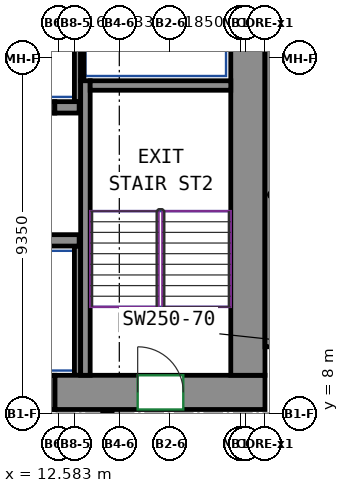
"""IFC4 building model, lengths in metres.
Left out: names, types, materials, properties, quantities, classifications, styles, units other than length and angle.
Written with IfcOpenShell. Run it as: python <this file> out.ifc"""

import sys

from ifc_helpers import new_model, si_unit, direction, frame, frame_2d, origin, place, context, subcontext, project, spatial, rectangle, extrude, source, transform, mapped, element, fill, save


model = new_model("IFC4")
c1 = context("Model", 3, precision=1e-05, world=origin(), true_north=direction((0.0, 1.0)))
c2 = subcontext(c1, "Body", "Model", "MODEL_VIEW")
j1 = project(units=[si_unit("LENGTHUNIT", "METRE"), si_unit("PLANEANGLEUNIT", "RADIAN")], contexts=[c1])
p1 = place(None, origin())
s1 = spatial("IfcSite", under=j1, at=p1, CompositionType="ELEMENT")
p2 = place(p1, origin())
s2 = spatial("IfcBuilding", under=s1, at=p2, CompositionType="ELEMENT")
p3 = place(p2, frame((0.0, 0.0, 154.1)))
s3 = spatial("IfcBuildingStorey", under=s2, at=p3, CompositionType="ELEMENT", Elevation=154.1)
m1 = source(origin(), c2, "Body", "SweptSolid", [
    extrude(rectangle(XDim=5.53, YDim=0.9, at=frame_2d((2.765, 0.0))), origin(), (0.0, 0.0, 1.0), 3.12),
])
p4 = place(p3, frame((12.47, 8.55, 0.0), z_axis=(0.0, 0.0, 1.0), x_axis=(1.0, 0.0, 0.0)))
e1 = element("IfcWall", 1, at=p4, inside=s3, PredefinedType="SHEAR", context=c2, shape_type="MappedRepresentation", body=[
    mapped(m1, transform((0.0, 0.0, 0.0))),
])
p5 = place(p4, frame((2.18, 0.0, 0.0)))
e2 = element("IfcOpeningElement", 2, at=p5, cuts=e1, PredefinedType="OPENING", context=c2, shape_type="SweptSolid", body=[
    extrude(rectangle(XDim=1.2, YDim=2.1, at=frame_2d((0.6, 1.05))), frame((0.0, 0.46, 0.0), z_axis=(0.0, -1.0, 0.0), x_axis=(1.0, 0.0, 0.0)), (0.0, 0.0, 1.0), 0.92),
])
m2 = source(origin(), c2, "Body", "SweptSolid", [
    extrude(rectangle(XDim=12.0, YDim=0.9, at=frame_2d((6.0, 0.0))), origin(), (0.0, 0.0, 1.0), 3.12),
])
p6 = place(p3, frame((17.55, 9.0, 0.0), z_axis=(0.0, 0.0, 1.0), x_axis=(0.0, 1.0, 0.0)))
e3 = element("IfcWall", 3, at=p6, inside=s3, PredefinedType="SHEAR", context=c2, shape_type="MappedRepresentation", body=[
    mapped(m2, transform((0.0, 0.0, 0.0))),
])
m3 = source(origin(), c2, "Body", "SweptSolid", [
    extrude(rectangle(XDim=7.75, YDim=0.25, at=frame_2d((3.875, 0.0))), origin(), (0.0, 0.0, 1.0), 3.12),
])
p7 = place(p3, frame((13.275, 9.0, 0.0), z_axis=(0.0, 0.0, 1.0), x_axis=(0.0, 1.0, 0.0)))
e4 = element("IfcWall", 4, at=p7, inside=s3, PredefinedType="SHEAR", context=c2, shape_type="MappedRepresentation", body=[
    mapped(m3, transform((0.0, 0.0, 0.0))),
])
m4 = source(origin(), c2, "Body", "SweptSolid", [
    extrude(rectangle(XDim=3.7, YDim=0.25, at=frame_2d((1.85, 0.0))), origin(), (0.0, 0.0, 1.0), 3.12),
])
p8 = place(p3, frame((13.4, 16.625, 0.0), z_axis=(0.0, 0.0, 1.0), x_axis=(1.0, 0.0, 0.0)))
e5 = element("IfcWall", 5, at=p8, inside=s3, PredefinedType="SHEAR", context=c2, shape_type="MappedRepresentation", body=[
    mapped(m4, transform((0.0, 0.0, 0.0))),
])
m5 = source(origin(), c2, "Body", "SweptSolid", [
    extrude(rectangle(XDim=8.0, YDim=0.35, at=frame_2d((4.0, 0.0))), origin(), (0.0, 0.0, 1.0), 3.12),
])
p9 = place(p3, frame((18.175, 9.75, 0.0), z_axis=(0.0, 0.0, 1.0), x_axis=(0.0, 1.0, 0.0)))
e6 = element("IfcWall", 6, at=p9, inside=s3, PredefinedType="SHEAR", context=c2, shape_type="MappedRepresentation", body=[
    mapped(m5, transform((0.0, 0.0, 0.0))),
])
m6 = source(origin(), c2, "Body", "SweptSolid", [
    extrude(rectangle(XDim=2.82, YDim=0.3, at=frame_2d((1.41, 0.0))), origin(), (0.0, 0.0, 1.0), 3.12),
])
p10 = place(p3, frame((10.29, 12.55, 0.0), z_axis=(0.0, 0.0, 1.0), x_axis=(1.0, 0.0, 0.0)))
e7 = element("IfcWall", 7, at=p10, inside=s3, PredefinedType="SHEAR", context=c2, shape_type="MappedRepresentation", body=[
    mapped(m6, transform((0.0, 0.0, 0.0))),
])
m7 = source(origin(), c2, "Body", "SweptSolid", [
    extrude(rectangle(XDim=0.64, YDim=0.3, at=frame_2d((0.32, 0.0))), origin(), (0.0, 0.0, 1.0), 3.12),
])
p11 = place(p3, frame((12.47, 16.05, 0.0), z_axis=(0.0, 0.0, 1.0), x_axis=(1.0, 0.0, 0.0)))
e8 = element("IfcWall", 8, at=p11, inside=s3, PredefinedType="SHEAR", context=c2, shape_type="MappedRepresentation", body=[
    mapped(m7, transform((0.0, 0.0, 0.0))),
])
m8 = source(origin(), c2, "Body", "SweptSolid", [
    extrude(rectangle(XDim=1.4, YDim=0.3, at=frame_2d((0.7, 0.0))), origin(), (0.0, 0.0, 1.0), 3.12),
])
p12 = place(p3, frame((11.07, 16.05, 0.0), z_axis=(0.0, 0.0, 1.0), x_axis=(1.0, 0.0, 0.0)))
e9 = element("IfcWall", 9, at=p12, inside=s3, PredefinedType="PARTITIONING", context=c2, shape_type="MappedRepresentation", body=[
    mapped(m8, transform((0.0, 0.0, 0.0))),
])
p13 = place(p12, frame((0.15, 0.0, 0.0)))
e10 = element("IfcOpeningElement", 10, at=p13, cuts=e9, PredefinedType="OPENING", context=c2, shape_type="SweptSolid", body=[
    extrude(rectangle(XDim=1.1, YDim=2.1, at=frame_2d((0.55, 1.05))), frame((0.0, 0.16, 0.0), z_axis=(0.0, -1.0, 0.0), x_axis=(1.0, 0.0, 0.0)), (0.0, 0.0, 1.0), 0.32),
])
m9 = source(origin(), c2, "Body", "SweptSolid", [
    extrude(rectangle(XDim=3.275, YDim=0.165, at=frame_2d((1.638, 0.0))), origin(), (0.0, 0.0, 1.0), 3.12),
])
p14 = place(p3, frame((13.067, 16.2, 0.0), z_axis=(0.0, 0.0, 1.0), x_axis=(0.0, 1.0, 0.0)))
e11 = element("IfcWall", 11, at=p14, inside=s3, PredefinedType="PARTITIONING", context=c2, shape_type="MappedRepresentation", body=[
    mapped(m9, transform((0.0, 0.0, 0.0))),
])
m10 = source(origin(), c2, "Body", "SweptSolid", [
    extrude(rectangle(XDim=2.725, YDim=0.085, at=frame_2d((1.363, 0.0))), origin(), (0.0, 0.0, 1.0), 3.12),
])
p15 = place(p3, frame((13.192, 16.75, 0.0), z_axis=(0.0, 0.0, 1.0), x_axis=(0.0, 1.0, 0.0)))
e12 = element("IfcWall", 12, at=p15, inside=s3, PredefinedType="PARTITIONING", context=c2, shape_type="MappedRepresentation", body=[
    mapped(m10, transform((0.0, 0.0, 0.0))),
])
m11 = source(origin(), c2, "Body", "SweptSolid", [
    extrude(rectangle(XDim=3.4, YDim=0.165, at=frame_2d((1.7, 0.0))), origin(), (0.0, 0.0, 1.0), 3.12),
])
p16 = place(p3, frame((13.067, 9.0, 0.0), z_axis=(0.0, 0.0, 1.0), x_axis=(0.0, 1.0, 0.0)))
e13 = element("IfcWall", 13, at=p16, inside=s3, PredefinedType="PARTITIONING", context=c2, shape_type="MappedRepresentation", body=[
    mapped(m11, transform((0.0, 0.0, 0.0))),
])
m12 = source(origin(), c2, "Body", "SweptSolid", [
    extrude(rectangle(XDim=1.4, YDim=0.9, at=frame_2d((0.7, 0.0))), origin(), (0.0, 0.0, 1.0), 2.7),
])
p17 = place(p3, frame((11.07, 8.55, 0.0), z_axis=(0.0, 0.0, 1.0), x_axis=(1.0, 0.0, 0.0)))
e14 = element("IfcWall", 14, at=p17, inside=s3, PredefinedType="PARTITIONING", context=c2, shape_type="MappedRepresentation", body=[
    mapped(m12, transform((0.0, 0.0, 0.0))),
])
p18 = place(p17, frame((0.25, 0.0, 0.0)))
e15 = element("IfcOpeningElement", 15, at=p18, cuts=e14, PredefinedType="OPENING", context=c2, shape_type="SweptSolid", body=[
    extrude(rectangle(XDim=0.9, YDim=2.1, at=frame_2d((0.45, 1.05))), frame((0.0, 0.46, 0.0), z_axis=(0.0, -1.0, 0.0), x_axis=(1.0, 0.0, 0.0)), (0.0, 0.0, 1.0), 0.92),
])
p19 = place(p5, origin())
e16 = element("IfcDoor", 16, at=p19, inside=s3, OperationType="DOUBLE_DOOR_SINGLE_SWING", PredefinedType="DOOR", context=c2, shape_type="SweptSolid", body=[
    extrude(rectangle(XDim=1.2, YDim=2.1, at=frame_2d((0.6, 1.05))), frame((0.0, 0.355, 0.0), z_axis=(0.0, -1.0, 0.0), x_axis=(1.0, 0.0, 0.0)), (0.0, 0.0, 1.0), 0.05),
])
fill(e2, e16)
save(model, sys.argv[1])
